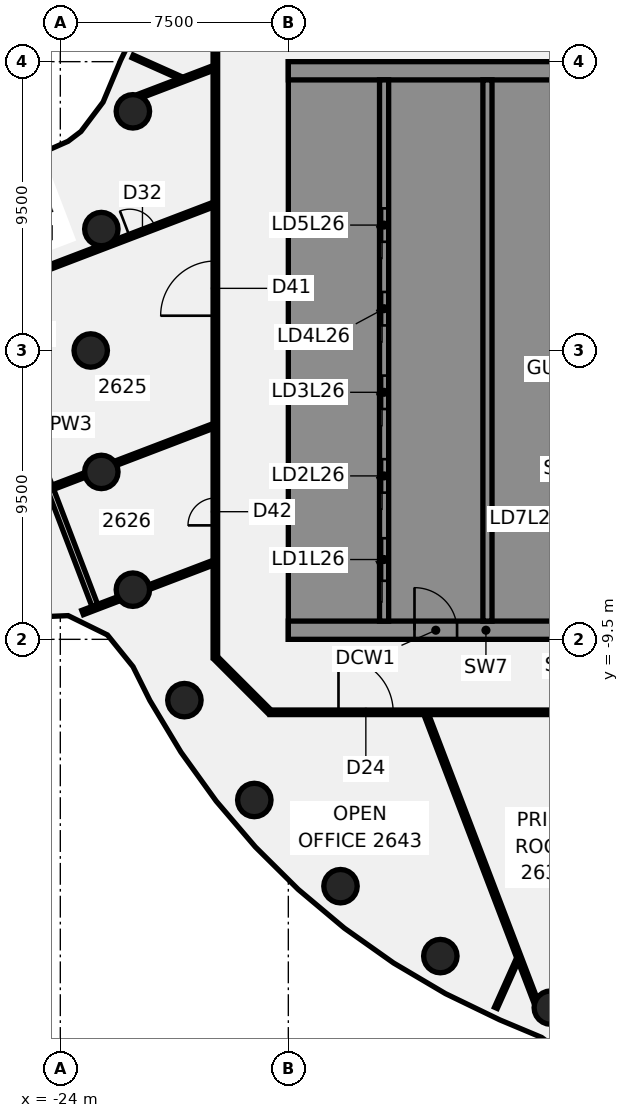
"""IFC4 building model, lengths in metres.
Left out: names, types, materials, properties, quantities, classifications, styles, units other than length and angle.
Written with IfcOpenShell. Run it as: python <this file> out.ifc"""

import sys

from ifc_helpers import new_model, si_unit, direction, frame, frame_2d, origin, origin_2d, place, context, subcontext, project, spatial, polyline, rectangle, circle, outline, extrude, element, fill, save


model = new_model("IFC4")
c1 = context("Model", 3, precision=1e-05, world=origin(), true_north=direction((0.0, 1.0)))
c2 = subcontext(c1, "Body", "Model", "MODEL_VIEW")
j1 = project(units=[si_unit("LENGTHUNIT", "METRE"), si_unit("PLANEANGLEUNIT", "RADIAN")], contexts=[c1])
p1 = place(None, origin())
s1 = spatial("IfcSite", under=j1, at=p1, CompositionType="ELEMENT")
p2 = place(p1, origin())
s2 = spatial("IfcBuilding", under=s1, at=p2, CompositionType="ELEMENT")
p3 = place(p2, frame((0.0, 0.0, 109.75)))
s3 = spatial("IfcBuildingStorey", under=s2, at=p3, CompositionType="ELEMENT", Elevation=109.75)
for number, where, z_axis, x_axis in (
    (1, (-21.613, 7.866, -0.14), (0.0, 0.0, 1.0), (1.0, 0.0, 0.0)),
    (2, (-22.651, 3.994, -0.14), (0.0, 0.0, 1.0), (1.0, 0.0, 0.0)),
    (3, (-23.0, 0.0, -0.14), (0.0, 0.0, 1.0), (1.0, 0.0, 0.0)),
    (4, (-22.651, -3.994, -0.14), (0.0, 0.0, 1.0), (1.0, 0.0, 0.0)),
    (5, (-21.613, -7.866, -0.14), (0.0, 0.0, 1.0), (1.0, 0.0, 0.0)),
    (6, (-19.919, -11.5, -0.14), (0.0, 0.0, 1.0), (1.0, 0.0, 0.0)),
    (7, (-17.619, -14.784, -0.14), (0.0, 0.0, 1.0), (1.0, 0.0, 0.0)),
    (8, (-14.784, -17.619, -0.14), (0.0, 0.0, 1.0), (1.0, 0.0, 0.0)),
    (9, (-11.5, -19.919, -0.14), (0.0, 0.0, 1.0), (1.0, 0.0, 0.0)),
    (10, (-7.866, -21.613, -0.14), (0.0, 0.0, 1.0), (1.0, 0.0, 0.0)),
):
    element("IfcColumn", number, at=place(p3, frame(where, z_axis=z_axis, x_axis=x_axis)), inside=s3, PredefinedType="COLUMN", context=c2, shape_type="SweptSolid", body=[
        extrude(circle(Radius=0.55, at=origin_2d()), origin(), (0.0, 0.0, 1.0), 3.75),
    ])
p4 = place(p3, frame((-27.94, 4.903, 0.0), z_axis=(0.0, 0.0, 1.0), x_axis=(0.356743238029, -0.934202473836, 0.0)))
e11 = element("IfcWall", 11, at=p4, inside=s3, PredefinedType="PARTITIONING", context=c2, shape_type="SweptSolid", body=[
    extrude(rectangle(XDim=14.224, YDim=0.2, at=frame_2d((7.112, 0.0))), origin(), (0.0, 0.0, 1.0), 3.01),
])
p5 = place(p4, frame((5.799, 0.0, 0.0)))
e12 = element("IfcOpeningElement", 12, at=p5, cuts=e11, PredefinedType="OPENING", context=c2, shape_type="SweptSolid", body=[
    extrude(rectangle(XDim=1.4, YDim=2.1, at=frame_2d((0.7, 1.05))), frame((0.0, 0.11, 0.0), z_axis=(0.0, -1.0, 0.0), x_axis=(1.0, 0.0, 0.0)), (0.0, 0.0, 1.0), 0.22),
])
p6 = place(p3, frame((-11.959, -11.984, 0.0), z_axis=(0.0, 0.0, 1.0), x_axis=(0.356734269096, -0.934205898747, 0.0)))
e13 = element("IfcWall", 13, at=p6, inside=s3, PredefinedType="PARTITIONING", context=c2, shape_type="SweptSolid", body=[
    extrude(rectangle(XDim=10.069, YDim=0.15, at=frame_2d((5.035, 0.0))), origin(), (0.0, 0.0, 1.0), 3.01),
])
p7 = place(p3, frame((-18.872, -10.128, 0.0), z_axis=(0.0, 0.0, 1.0), x_axis=(0.707106781187, -0.707106781187, 0.0)))
e14 = element("IfcWall", 14, at=p7, inside=s3, PredefinedType="PARTITIONING", context=c2, shape_type="SweptSolid", body=[
    extrude(rectangle(XDim=2.465, YDim=0.15, at=frame_2d((1.232, 0.0))), origin(), (0.0, 0.0, 1.0), 3.01),
])
p8 = place(p3, frame((-21.62, 9.673, 0.0), z_axis=(0.0, 0.0, 1.0), x_axis=(0.912814026116, -0.408375505785, 0.0)))
e15 = element("IfcWall", 15, at=p8, inside=s3, PredefinedType="PARTITIONING", context=c2, shape_type="SweptSolid", body=[
    extrude(rectangle(XDim=1.7, YDim=0.1, at=frame_2d((0.85, 0.0))), origin(), (0.0, 0.0, 1.0), 3.01),
])
p9 = place(p3, frame((-17.1, -11.9, 0.0), z_axis=(0.0, 0.0, 1.0), x_axis=(1.0, 0.0, 0.0)))
e16 = element("IfcWall", 16, at=p9, inside=s3, PredefinedType="PARTITIONING", context=c2, shape_type="SweptSolid", body=[
    extrude(rectangle(XDim=34.165, YDim=0.15, at=frame_2d((17.083, 0.0))), origin(), (0.0, 0.0, 1.0), 3.01),
])
p10 = place(p9, frame((12.305, 0.0, 0.0)))
e17 = element("IfcOpeningElement", 17, at=p10, cuts=e16, PredefinedType="OPENING", context=c2, shape_type="SweptSolid", body=[
    extrude(rectangle(XDim=1.8, YDim=2.1, at=frame_2d((0.9, 1.05))), frame((0.0, 0.085, 0.0), z_axis=(0.0, -1.0, 0.0), x_axis=(1.0, 0.0, 0.0)), (0.0, 0.0, 1.0), 0.17),
])
p11 = place(p9, frame((2.25, 0.0, 0.0)))
e18 = element("IfcOpeningElement", 18, at=p11, cuts=e16, PredefinedType="OPENING", context=c2, shape_type="SweptSolid", body=[
    extrude(rectangle(XDim=1.8, YDim=2.1, at=frame_2d((0.9, 1.05))), frame((0.0, 0.085, 0.0), z_axis=(0.0, -1.0, 0.0), x_axis=(1.0, 0.0, 0.0)), (0.0, 0.0, 1.0), 0.17),
])
p12 = place(p9, frame((26.779, 0.0, 0.0)))
e19 = element("IfcOpeningElement", 19, at=p12, cuts=e16, PredefinedType="OPENING", context=c2, shape_type="SweptSolid", body=[
    extrude(rectangle(XDim=1.8, YDim=2.1, at=frame_2d((0.9, 1.05))), frame((0.0, 0.085, 0.0), z_axis=(0.0, -1.0, 0.0), x_axis=(1.0, 0.0, 0.0)), (0.0, 0.0, 1.0), 0.17),
])
p13 = place(p3, frame((-26.665, 1.858, 0.0), z_axis=(0.0, 0.0, 1.0), x_axis=(0.934218386179, 0.356701565632, 0.0)))
e20 = element("IfcWall", 20, at=p13, inside=s3, PredefinedType="PARTITIONING", context=c2, shape_type="SweptSolid", body=[
    extrude(rectangle(XDim=8.221, YDim=0.15, at=frame_2d((4.111, 0.0))), origin(), (0.0, 0.0, 1.0), 3.01),
])
p14 = place(p13, frame((5.295, 0.0, 0.0)))
e21 = element("IfcOpeningElement", 21, at=p14, cuts=e20, PredefinedType="OPENING", context=c2, shape_type="SweptSolid", body=[
    extrude(rectangle(XDim=0.9, YDim=2.1, at=frame_2d((0.45, 1.05))), frame((0.0, 0.085, 0.0), z_axis=(0.0, -1.0, 0.0), x_axis=(1.0, 0.0, 0.0)), (0.0, 0.0, 1.0), 0.17),
])
p15 = place(p3, frame((-24.239, -4.494, 0.0), z_axis=(0.0, 0.0, 1.0), x_axis=(0.934251139731, 0.356615770698, 0.0)))
e22 = element("IfcWall", 22, at=p15, inside=s3, PredefinedType="PARTITIONING", context=c2, shape_type="SweptSolid", body=[
    extrude(rectangle(XDim=1.129, YDim=0.15, at=frame_2d((0.564, 0.0))), origin(), (0.0, 0.0, 1.0), 3.01),
])
p16 = place(p3, frame((-22.174, -3.706, 0.0), z_axis=(0.0, 0.0, 1.0), x_axis=(0.934220119269, 0.356697026555, 0.0)))
e23 = element("IfcWall", 23, at=p16, inside=s3, PredefinedType="PARTITIONING", context=c2, shape_type="SweptSolid", body=[
    extrude(rectangle(XDim=3.414, YDim=0.15, at=frame_2d((1.707, 0.0))), origin(), (0.0, 0.0, 1.0), 3.01),
])
p17 = place(p3, frame((-23.267, -8.619, 0.0), z_axis=(0.0, 0.0, 1.0), x_axis=(0.9342532872, 0.356610144775, 0.0)))
e24 = element("IfcWall", 24, at=p17, inside=s3, PredefinedType="PARTITIONING", context=c2, shape_type="SweptSolid", body=[
    extrude(rectangle(XDim=1.271, YDim=0.15, at=frame_2d((0.636, 0.0))), origin(), (0.0, 0.0, 1.0), 3.01),
])
p18 = place(p3, frame((-21.075, -7.782, 0.0), z_axis=(0.0, 0.0, 1.0), x_axis=(0.934278508333, 0.35654406301, 0.0)))
e25 = element("IfcWall", 25, at=p18, inside=s3, PredefinedType="PARTITIONING", context=c2, shape_type="SweptSolid", body=[
    extrude(rectangle(XDim=2.239, YDim=0.15, at=frame_2d((1.119, 0.0))), origin(), (0.0, 0.0, 1.0), 3.01),
])
p19 = place(p3, frame((-21.392, 8.367, 0.0), z_axis=(0.0, 0.0, 1.0), x_axis=(0.934182801588, 0.356794749425, 0.0)))
e26 = element("IfcWall", 26, at=p19, inside=s3, PredefinedType="PARTITIONING", context=c2, shape_type="SweptSolid", body=[
    extrude(rectangle(XDim=2.578, YDim=0.15, at=frame_2d((1.289, 0.0))), origin(), (0.0, 0.0, 1.0), 3.01),
])
p20 = place(p3, frame((-9.673, -21.62, 0.0), z_axis=(0.0, 0.0, 1.0), x_axis=(0.408435119279, 0.912787353845, 0.0)))
e27 = element("IfcWall", 27, at=p20, inside=s3, PredefinedType="PARTITIONING", context=c2, shape_type="SweptSolid", body=[
    extrude(rectangle(XDim=1.705, YDim=0.1, at=frame_2d((0.853, 0.0))), origin(), (0.0, 0.0, 1.0), 3.01),
])
p21 = place(p3, frame((-18.9, -10.1, 0.0), z_axis=(0.0, 0.0, 1.0), x_axis=(0.0, 1.0, 0.0)))
e28 = element("IfcWall", 28, at=p21, inside=s3, PredefinedType="PARTITIONING", context=c2, shape_type="SweptSolid", body=[
    extrude(rectangle(XDim=20.2, YDim=0.15, at=frame_2d((10.1, 0.0))), origin(), (0.0, 0.0, 1.0), 3.01),
])
p22 = place(p21, frame((11.244, 0.0, 0.0)))
e29 = element("IfcOpeningElement", 29, at=p22, cuts=e28, PredefinedType="OPENING", context=c2, shape_type="SweptSolid", body=[
    extrude(rectangle(XDim=1.8, YDim=2.1, at=frame_2d((0.9, 1.05))), frame((0.0, 0.085, 0.0), z_axis=(0.0, -1.0, 0.0), x_axis=(1.0, 0.0, 0.0)), (0.0, 0.0, 1.0), 0.17),
])
p23 = place(p21, frame((4.348, 0.0, 0.0)))
e30 = element("IfcOpeningElement", 30, at=p23, cuts=e28, PredefinedType="OPENING", context=c2, shape_type="SweptSolid", body=[
    extrude(rectangle(XDim=0.9, YDim=2.1, at=frame_2d((0.45, 1.05))), frame((0.0, 0.085, 0.0), z_axis=(0.0, -1.0, 0.0), x_axis=(1.0, 0.0, 0.0)), (0.0, 0.0, 1.0), 0.17),
])
p24 = place(p3, frame((-16.5, -9.2, 0.0), z_axis=(0.0, 0.0, 1.0), x_axis=(1.0, 0.0, 0.0)))
e31 = element("IfcWall", 31, at=p24, inside=s3, PredefinedType="SHEAR", context=c2, shape_type="SweptSolid", body=[
    extrude(rectangle(XDim=13.0, YDim=0.6, at=frame_2d((6.5, 0.0))), origin(), (0.0, 0.0, 1.0), 3.61),
])
p25 = place(p24, frame((4.15, 0.0, 0.0)))
e32 = element("IfcOpeningElement", 32, at=p25, cuts=e31, PredefinedType="OPENING", context=c2, shape_type="SweptSolid", body=[
    extrude(rectangle(XDim=1.4, YDim=2.1, at=frame_2d((0.7, 1.05))), frame((0.0, 0.31, 0.0), z_axis=(0.0, -1.0, 0.0), x_axis=(1.0, 0.0, 0.0)), (0.0, 0.0, 1.0), 0.62),
])
p26 = place(p24, frame((10.125, 0.0, 0.0)))
e33 = element("IfcOpeningElement", 33, at=p26, cuts=e31, PredefinedType="OPENING", context=c2, shape_type="SweptSolid", body=[
    extrude(rectangle(XDim=1.4, YDim=2.1, at=frame_2d((0.7, 1.05))), frame((0.0, 0.31, 0.0), z_axis=(0.0, -1.0, 0.0), x_axis=(1.0, 0.0, 0.0)), (0.0, 0.0, 1.0), 0.62),
])
p27 = place(p3, origin())
e34 = element("IfcWall", 34, at=p27, inside=s3, PredefinedType="SHEAR", context=c2, shape_type="SweptSolid", body=[
    extrude(outline(polyline([(-13.5, -8.9), (-13.5, -8.125), (-15.9, -8.125), (-15.9, -5.625), (-13.5, -5.625), (-13.5, -5.375), (-15.9, -5.375), (-15.9, -2.875), (-13.5, -2.875), (-13.5, -2.625), (-15.9, -2.625), (-15.9, -0.125), (-13.5, -0.125), (-13.5, 0.125), (-15.9, 0.125), (-15.9, 2.625), (-13.5, 2.625), (-13.5, 2.875), (-15.9, 2.875), (-15.9, 5.375), (-13.5, 5.375), (-13.5, 5.625), (-15.9, 5.625), (-15.9, 8.125), (-13.5, 8.125), (-13.5, 8.9), (-15.9, 8.9), (-16.5, 8.9), (-16.5, -8.9), (-15.9, -8.9), (-13.5, -8.9)])), origin(), (0.0, 0.0, 1.0), 3.61),
])
p28 = place(p3, frame((-16.5, 9.2, 0.0), z_axis=(0.0, 0.0, 1.0), x_axis=(1.0, 0.0, 0.0)))
e35 = element("IfcWall", 35, at=p28, inside=s3, PredefinedType="SHEAR", context=c2, shape_type="SweptSolid", body=[
    extrude(rectangle(XDim=13.0, YDim=0.6, at=frame_2d((6.5, 0.0))), origin(), (0.0, 0.0, 1.0), 3.61),
])
p29 = place(p3, origin())
e36 = element("IfcWall", 36, at=p29, inside=s3, PredefinedType="SHEAR", context=c2, shape_type="SweptSolid", body=[
    extrude(outline(polyline([(-9.8, -5.375), (-9.8, -5.625), (-7.5, -5.625), (-7.2, -5.625), (-7.2, 8.9), (-7.5, 8.9), (-9.8, 8.9), (-9.8, 8.125), (-7.5, 8.125), (-7.5, 5.625), (-9.8, 5.625), (-9.8, 5.375), (-7.5, 5.375), (-7.5, 2.875), (-9.8, 2.875), (-9.8, 2.625), (-7.5, 2.625), (-7.5, 0.125), (-9.8, 0.125), (-9.8, -0.125), (-7.5, -0.125), (-7.5, -2.625), (-9.8, -2.625), (-9.8, -2.875), (-7.5, -2.875), (-7.5, -5.375), (-9.8, -5.375)])), origin(), (0.0, 0.0, 1.0), 3.61),
])
p30 = place(p3, origin())
e37 = element("IfcWall", 37, at=p30, inside=s3, PredefinedType="SHEAR", context=c2, shape_type="SweptSolid", body=[
    extrude(outline(polyline([(-7.5, -8.125), (-9.55, -8.125), (-9.55, -5.625), (-9.8, -5.625), (-9.8, -8.125), (-9.8, -8.9), (-7.5, -8.9), (-7.5, -8.125)])), origin(), (0.0, 0.0, 1.0), 3.61),
])
p31 = place(p3, frame((-13.35, -8.9, 0.0), z_axis=(0.0, 0.0, 1.0), x_axis=(0.0, 1.0, 0.0)))
e38 = element("IfcWall", 38, at=p31, inside=s3, PredefinedType="SHEAR", context=c2, shape_type="SweptSolid", body=[
    extrude(rectangle(XDim=17.8, YDim=0.3, at=frame_2d((8.9, 0.0))), origin(), (0.0, 0.0, 1.0), 3.61),
])
p32 = place(p31, frame((1.325, 0.0, 0.0)))
e39 = element("IfcOpeningElement", 39, at=p32, cuts=e38, PredefinedType="OPENING", context=c2, shape_type="SweptSolid", body=[
    extrude(rectangle(XDim=1.4, YDim=2.1, at=frame_2d((0.7, 1.05))), frame((0.0, 0.16, 0.0), z_axis=(0.0, -1.0, 0.0), x_axis=(1.0, 0.0, 0.0)), (0.0, 0.0, 1.0), 0.32),
])
p33 = place(p31, frame((4.225, 0.0, 0.0)))
e40 = element("IfcOpeningElement", 40, at=p33, cuts=e38, PredefinedType="OPENING", context=c2, shape_type="SweptSolid", body=[
    extrude(rectangle(XDim=1.1, YDim=2.1, at=frame_2d((0.55, 1.05))), frame((0.0, 0.16, 0.0), z_axis=(0.0, -1.0, 0.0), x_axis=(1.0, 0.0, 0.0)), (0.0, 0.0, 1.0), 0.32),
])
p34 = place(p31, frame((6.975, 0.0, 0.0)))
e41 = element("IfcOpeningElement", 41, at=p34, cuts=e38, PredefinedType="OPENING", context=c2, shape_type="SweptSolid", body=[
    extrude(rectangle(XDim=1.1, YDim=2.1, at=frame_2d((0.55, 1.05))), frame((0.0, 0.16, 0.0), z_axis=(0.0, -1.0, 0.0), x_axis=(1.0, 0.0, 0.0)), (0.0, 0.0, 1.0), 0.32),
])
p35 = place(p31, frame((9.725, 0.0, 0.0)))
e42 = element("IfcOpeningElement", 42, at=p35, cuts=e38, PredefinedType="OPENING", context=c2, shape_type="SweptSolid", body=[
    extrude(rectangle(XDim=1.1, YDim=2.1, at=frame_2d((0.55, 1.05))), frame((0.0, 0.16, 0.0), z_axis=(0.0, -1.0, 0.0), x_axis=(1.0, 0.0, 0.0)), (0.0, 0.0, 1.0), 0.32),
])
p36 = place(p31, frame((12.475, 0.0, 0.0)))
e43 = element("IfcOpeningElement", 43, at=p36, cuts=e38, PredefinedType="OPENING", context=c2, shape_type="SweptSolid", body=[
    extrude(rectangle(XDim=1.1, YDim=2.1, at=frame_2d((0.55, 1.05))), frame((0.0, 0.16, 0.0), z_axis=(0.0, -1.0, 0.0), x_axis=(1.0, 0.0, 0.0)), (0.0, 0.0, 1.0), 0.32),
])
p37 = place(p3, frame((-9.95, -8.9, 0.0), z_axis=(0.0, 0.0, 1.0), x_axis=(0.0, 1.0, 0.0)))
e44 = element("IfcWall", 44, at=p37, inside=s3, PredefinedType="SHEAR", context=c2, shape_type="SweptSolid", body=[
    extrude(rectangle(XDim=17.8, YDim=0.3, at=frame_2d((8.9, 0.0))), origin(), (0.0, 0.0, 1.0), 3.61),
])
p38 = place(p11, frame((1.8, 0.0, 0.0), z_axis=(0.0, 0.0, 1.0), x_axis=(-1.0, 0.0, 0.0)))
e45 = element("IfcDoor", 45, at=p38, inside=s3, OperationType="DOUBLE_DOOR_SINGLE_SWING", PredefinedType="DOOR", context=c2, shape_type="SweptSolid", body=[
    extrude(rectangle(XDim=1.8, YDim=2.1, at=frame_2d((0.9, 1.05))), frame((0.0, 0.025, 0.0), z_axis=(0.0, -1.0, 0.0), x_axis=(1.0, 0.0, 0.0)), (0.0, 0.0, 1.0), 0.05),
])
fill(e18, e45)
p39 = place(p14, origin())
e46 = element("IfcDoor", 46, at=p39, inside=s3, OperationType="SINGLE_SWING_LEFT", PredefinedType="DOOR", context=c2, shape_type="SweptSolid", body=[
    extrude(rectangle(XDim=0.9, YDim=2.1, at=frame_2d((0.45, 1.05))), frame((0.0, 0.025, 0.0), z_axis=(0.0, -1.0, 0.0), x_axis=(1.0, 0.0, 0.0)), (0.0, 0.0, 1.0), 0.05),
])
fill(e21, e46)
p40 = place(p22, frame((1.8, 0.0, 0.0), z_axis=(0.0, 0.0, 1.0), x_axis=(-1.0, 0.0, 0.0)))
e47 = element("IfcDoor", 47, at=p40, inside=s3, OperationType="DOUBLE_DOOR_SINGLE_SWING", PredefinedType="DOOR", context=c2, shape_type="SweptSolid", body=[
    extrude(rectangle(XDim=1.8, YDim=2.1, at=frame_2d((0.9, 1.05))), frame((0.0, 0.025, 0.0), z_axis=(0.0, -1.0, 0.0), x_axis=(1.0, 0.0, 0.0)), (0.0, 0.0, 1.0), 0.05),
])
fill(e29, e47)
p41 = place(p23, origin())
e48 = element("IfcDoor", 48, at=p41, inside=s3, OperationType="SINGLE_SWING_RIGHT", PredefinedType="DOOR", context=c2, shape_type="SweptSolid", body=[
    extrude(rectangle(XDim=0.9, YDim=2.1, at=frame_2d((0.45, 1.05))), frame((0.0, 0.025, 0.0), z_axis=(0.0, -1.0, 0.0), x_axis=(1.0, 0.0, 0.0)), (0.0, 0.0, 1.0), 0.05),
])
fill(e30, e48)
p42 = place(p25, origin())
e49 = element("IfcDoor", 49, at=p42, inside=s3, OperationType="SINGLE_SWING_LEFT", PredefinedType="DOOR", context=c2, shape_type="SweptSolid", body=[
    extrude(rectangle(XDim=1.4, YDim=2.1, at=frame_2d((0.7, 1.05))), frame((0.0, 0.025, 0.0), z_axis=(0.0, -1.0, 0.0), x_axis=(1.0, 0.0, 0.0)), (0.0, 0.0, 1.0), 0.05),
])
fill(e32, e49)
p43 = place(p32, origin())
e50 = element("IfcDoor", 50, at=p43, inside=s3, OperationType="SLIDING_TO_LEFT", PredefinedType="DOOR", context=c2, shape_type="SweptSolid", body=[
    extrude(rectangle(XDim=1.4, YDim=2.1, at=frame_2d((0.7, 1.05))), frame((0.0, 0.025, 0.0), z_axis=(0.0, -1.0, 0.0), x_axis=(1.0, 0.0, 0.0)), (0.0, 0.0, 1.0), 0.05),
])
fill(e39, e50)
p44 = place(p33, origin())
e51 = element("IfcDoor", 51, at=p44, inside=s3, OperationType="SLIDING_TO_LEFT", PredefinedType="DOOR", context=c2, shape_type="SweptSolid", body=[
    extrude(rectangle(XDim=1.1, YDim=2.1, at=frame_2d((0.55, 1.05))), frame((0.0, 0.025, 0.0), z_axis=(0.0, -1.0, 0.0), x_axis=(1.0, 0.0, 0.0)), (0.0, 0.0, 1.0), 0.05),
])
fill(e40, e51)
p45 = place(p34, origin())
e52 = element("IfcDoor", 52, at=p45, inside=s3, OperationType="SLIDING_TO_LEFT", PredefinedType="DOOR", context=c2, shape_type="SweptSolid", body=[
    extrude(rectangle(XDim=1.1, YDim=2.1, at=frame_2d((0.55, 1.05))), frame((0.0, 0.025, 0.0), z_axis=(0.0, -1.0, 0.0), x_axis=(1.0, 0.0, 0.0)), (0.0, 0.0, 1.0), 0.05),
])
fill(e41, e52)
p46 = place(p35, origin())
e53 = element("IfcDoor", 53, at=p46, inside=s3, OperationType="SLIDING_TO_LEFT", PredefinedType="DOOR", context=c2, shape_type="SweptSolid", body=[
    extrude(rectangle(XDim=1.1, YDim=2.1, at=frame_2d((0.55, 1.05))), frame((0.0, 0.025, 0.0), z_axis=(0.0, -1.0, 0.0), x_axis=(1.0, 0.0, 0.0)), (0.0, 0.0, 1.0), 0.05),
])
fill(e42, e53)
p47 = place(p36, origin())
e54 = element("IfcDoor", 54, at=p47, inside=s3, OperationType="SLIDING_TO_LEFT", PredefinedType="DOOR", context=c2, shape_type="SweptSolid", body=[
    extrude(rectangle(XDim=1.1, YDim=2.1, at=frame_2d((0.55, 1.05))), frame((0.0, 0.025, 0.0), z_axis=(0.0, -1.0, 0.0), x_axis=(1.0, 0.0, 0.0)), (0.0, 0.0, 1.0), 0.05),
])
fill(e43, e54)
save(model, sys.argv[1])
